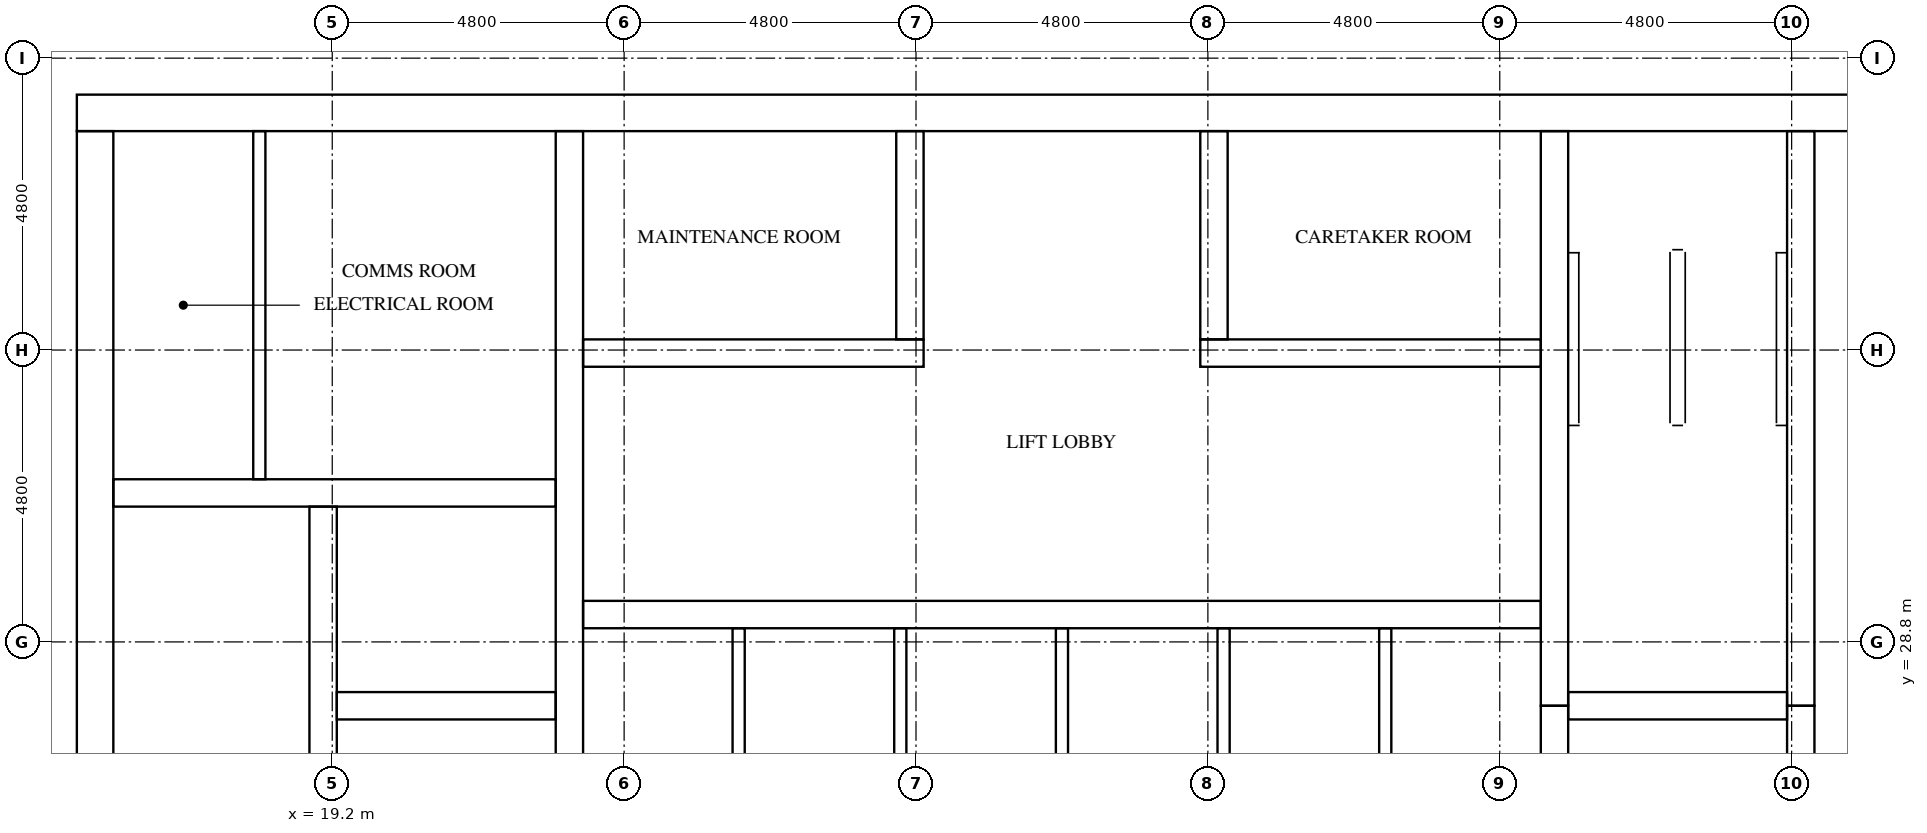
"""IFC4 building model, lengths in metres.
Left out: names, types, materials, properties, quantities, classifications, styles, units other than length and angle.
Written with IfcOpenShell. Run it as: python <this file> out.ifc"""

import sys

from ifc_helpers import new_model, si_unit, direction, frame, frame_2d, origin, place, context, subcontext, project, spatial, rectangle, extrude, element, fill, save


model = new_model("IFC4")
c1 = context("Model", 3, precision=1e-05, world=origin(), true_north=direction((0.0, 1.0)))
c2 = subcontext(c1, "Body", "Model", "MODEL_VIEW")
j1 = project(units=[si_unit("LENGTHUNIT", "METRE"), si_unit("PLANEANGLEUNIT", "RADIAN")], contexts=[c1])
p1 = place(None, origin())
s1 = spatial("IfcSite", under=j1, at=p1, CompositionType="ELEMENT")
p2 = place(p1, origin())
s2 = spatial("IfcBuilding", under=s1, at=p2, CompositionType="ELEMENT")
p3 = place(p2, frame((0.0, 0.0, 252.7)))
s3 = spatial("IfcBuildingStorey", under=s2, at=p3, CompositionType="ELEMENT", Elevation=252.7)
p4 = place(p3, frame((15.0, 37.5, 0.0), z_axis=(0.0, 0.0, 1.0), x_axis=(1.0, 0.0, 0.0)))
e1 = element("IfcWall", 1, at=p4, inside=s3, PredefinedType="SHEAR", context=c2, shape_type="SweptSolid", body=[
    extrude(rectangle(XDim=32.4, YDim=0.6, at=frame_2d((16.2, 0.0))), origin(), (0.0, 0.0, 1.0), 3.2),
])
p5 = place(p4, frame((15.3, 0.0, 0.0)))
e2 = element("IfcOpeningElement", 2, at=p5, cuts=e1, PredefinedType="OPENING", context=c2, shape_type="SweptSolid", body=[
    extrude(rectangle(XDim=1.8, YDim=2.1, at=frame_2d((0.9, 1.05))), frame((0.0, 0.31, 0.0), z_axis=(0.0, -1.0, 0.0), x_axis=(1.0, 0.0, 0.0)), (0.0, 0.0, 1.0), 0.62),
])
p6 = place(p4, frame((1.25, 0.0, 0.0)))
e3 = element("IfcOpeningElement", 3, at=p6, cuts=e1, PredefinedType="OPENING", context=c2, shape_type="SweptSolid", body=[
    extrude(rectangle(XDim=1.0, YDim=2.1, at=frame_2d((0.5, 1.05))), frame((0.0, 0.31, 0.0), z_axis=(0.0, -1.0, 0.0), x_axis=(1.0, 0.0, 0.0)), (0.0, 0.0, 1.0), 0.62),
])
p7 = place(p4, frame((4.988, 0.0, 0.0)))
e4 = element("IfcOpeningElement", 4, at=p7, cuts=e1, PredefinedType="OPENING", context=c2, shape_type="SweptSolid", body=[
    extrude(rectangle(XDim=1.0, YDim=2.1, at=frame_2d((0.5, 1.05))), frame((0.0, 0.31, 0.0), z_axis=(0.0, -1.0, 0.0), x_axis=(1.0, 0.0, 0.0)), (0.0, 0.0, 1.0), 0.62),
])
p8 = place(p3, frame((15.3, 15.6, 0.0), z_axis=(0.0, 0.0, 1.0), x_axis=(0.0, 1.0, 0.0)))
e5 = element("IfcWall", 5, at=p8, inside=s3, PredefinedType="SHEAR", context=c2, shape_type="SweptSolid", body=[
    extrude(rectangle(XDim=21.6, YDim=0.6, at=frame_2d((10.8, 0.0))), origin(), (0.0, 0.0, 1.0), 3.2),
])
p9 = place(p8, frame((5.16, 0.0, 0.0)))
e6 = element("IfcOpeningElement", 6, at=p9, cuts=e5, PredefinedType="OPENING", context=c2, shape_type="SweptSolid", body=[
    extrude(rectangle(XDim=1.2, YDim=2.1, at=frame_2d((0.6, 1.05))), frame((0.0, 0.31, 0.0), z_axis=(0.0, -1.0, 0.0), x_axis=(1.0, 0.0, 0.0)), (0.0, 0.0, 1.0), 0.62),
])
p10 = place(p3, frame((19.05, 15.6, 0.0), z_axis=(0.0, 0.0, 1.0), x_axis=(0.0, 1.0, 0.0)))
e7 = element("IfcWall", 7, at=p10, inside=s3, PredefinedType="SHEAR", context=c2, shape_type="SweptSolid", body=[
    extrude(rectangle(XDim=15.425, YDim=0.45, at=frame_2d((7.712, 0.0))), origin(), (0.0, 0.0, 1.0), 3.2),
])
p11 = place(p10, frame((9.85, 0.0, 0.0)))
e8 = element("IfcOpeningElement", 8, at=p11, cuts=e7, PredefinedType="OPENING", context=c2, shape_type="SweptSolid", body=[
    extrude(rectangle(XDim=1.1, YDim=2.1, at=frame_2d((0.55, 1.05))), frame((0.0, 0.235, 0.0), z_axis=(0.0, -1.0, 0.0), x_axis=(1.0, 0.0, 0.0)), (0.0, 0.0, 1.0), 0.47),
])
p12 = place(p10, frame((13.35, 0.0, 0.0)))
e9 = element("IfcOpeningElement", 9, at=p12, cuts=e7, PredefinedType="OPENING", context=c2, shape_type="SweptSolid", body=[
    extrude(rectangle(XDim=1.1, YDim=2.1, at=frame_2d((0.55, 1.05))), frame((0.0, 0.235, 0.0), z_axis=(0.0, -1.0, 0.0), x_axis=(1.0, 0.0, 0.0)), (0.0, 0.0, 1.0), 0.47),
])
p13 = place(p10, frame((0.6, 0.0, 0.0)))
e10 = element("IfcOpeningElement", 10, at=p13, cuts=e7, PredefinedType="OPENING", context=c2, shape_type="SweptSolid", body=[
    extrude(rectangle(XDim=1.2, YDim=2.1, at=frame_2d((0.6, 1.05))), frame((0.0, 0.235, 0.0), z_axis=(0.0, -1.0, 0.0), x_axis=(1.0, 0.0, 0.0)), (0.0, 0.0, 1.0), 0.47),
])
p14 = place(p3, frame((23.1, 15.6, 0.0), z_axis=(0.0, 0.0, 1.0), x_axis=(0.0, 1.0, 0.0)))
e11 = element("IfcWall", 11, at=p14, inside=s3, PredefinedType="SHEAR", context=c2, shape_type="SweptSolid", body=[
    extrude(rectangle(XDim=21.6, YDim=0.45, at=frame_2d((10.8, 0.0))), origin(), (0.0, 0.0, 1.0), 3.2),
])
p15 = place(p3, frame((39.3, 24.25, 0.0), z_axis=(0.0, 0.0, 1.0), x_axis=(0.0, 1.0, 0.0)))
e12 = element("IfcWall", 12, at=p15, inside=s3, PredefinedType="SHEAR", context=c2, shape_type="SweptSolid", body=[
    extrude(rectangle(XDim=3.5, YDim=0.45, at=frame_2d((1.75, 0.0))), origin(), (0.0, 0.0, 1.0), 3.2),
])
p16 = place(p3, frame((39.3, 27.75, 0.0), z_axis=(0.0, 0.0, 1.0), x_axis=(0.0, 1.0, 0.0)))
e13 = element("IfcWall", 13, at=p16, inside=s3, PredefinedType="SHEAR", context=c2, shape_type="SweptSolid", body=[
    extrude(rectangle(XDim=9.45, YDim=0.45, at=frame_2d((4.725, 0.0))), origin(), (0.0, 0.0, 1.0), 3.2),
])
p17 = place(p3, frame((43.35, 24.25, 0.0), z_axis=(0.0, 0.0, 1.0), x_axis=(0.0, 1.0, 0.0)))
e14 = element("IfcWall", 14, at=p17, inside=s3, PredefinedType="SHEAR", context=c2, shape_type="SweptSolid", body=[
    extrude(rectangle(XDim=3.5, YDim=0.45, at=frame_2d((1.75, 0.0))), origin(), (0.0, 0.0, 1.0), 3.2),
])
p18 = place(p17, frame((1.2, 0.0, 0.0)))
e15 = element("IfcOpeningElement", 15, at=p18, cuts=e14, PredefinedType="OPENING", context=c2, shape_type="SweptSolid", body=[
    extrude(rectangle(XDim=1.1, YDim=2.1, at=frame_2d((0.55, 1.05))), frame((0.0, 0.235, 0.0), z_axis=(0.0, -1.0, 0.0), x_axis=(1.0, 0.0, 0.0)), (0.0, 0.0, 1.0), 0.47),
])
p19 = place(p3, frame((43.35, 27.75, 0.0), z_axis=(0.0, 0.0, 1.0), x_axis=(0.0, 1.0, 0.0)))
e16 = element("IfcWall", 16, at=p19, inside=s3, PredefinedType="SHEAR", context=c2, shape_type="SweptSolid", body=[
    extrude(rectangle(XDim=9.45, YDim=0.45, at=frame_2d((4.725, 0.0))), origin(), (0.0, 0.0, 1.0), 3.2),
])
p20 = place(p19, frame((7.65, 0.0, 0.0)))
e17 = element("IfcOpeningElement", 17, at=p20, cuts=e16, PredefinedType="OPENING", context=c2, shape_type="SweptSolid", body=[
    extrude(rectangle(XDim=1.2, YDim=2.1, at=frame_2d((0.6, 1.05))), frame((0.0, 0.235, 0.0), z_axis=(0.0, -1.0, 0.0), x_axis=(1.0, 0.0, 0.0)), (0.0, 0.0, 1.0), 0.47),
])
p21 = place(p3, frame((19.275, 27.75, 0.0), z_axis=(0.0, 0.0, 1.0), x_axis=(1.0, 0.0, 0.0)))
e18 = element("IfcWall", 18, at=p21, inside=s3, PredefinedType="SHEAR", context=c2, shape_type="SweptSolid", body=[
    extrude(rectangle(XDim=3.6, YDim=0.45, at=frame_2d((1.8, 0.0))), origin(), (0.0, 0.0, 1.0), 3.2),
])
p22 = place(p3, frame((15.6, 31.25, 0.0), z_axis=(0.0, 0.0, 1.0), x_axis=(1.0, 0.0, 0.0)))
e19 = element("IfcWall", 19, at=p22, inside=s3, PredefinedType="SHEAR", context=c2, shape_type="SweptSolid", body=[
    extrude(rectangle(XDim=7.275, YDim=0.45, at=frame_2d((3.637, 0.0))), origin(), (0.0, 0.0, 1.0), 3.2),
])
p23 = place(p3, frame((39.525, 27.75, 0.0), z_axis=(0.0, 0.0, 1.0), x_axis=(1.0, 0.0, 0.0)))
e20 = element("IfcWall", 20, at=p23, inside=s3, PredefinedType="SHEAR", context=c2, shape_type="SweptSolid", body=[
    extrude(rectangle(XDim=3.6, YDim=0.45, at=frame_2d((1.8, 0.0))), origin(), (0.0, 0.0, 1.0), 3.2),
])
p24 = place(p3, frame((23.325, 29.25, 0.0), z_axis=(0.0, 0.0, 1.0), x_axis=(1.0, 0.0, 0.0)))
e21 = element("IfcWall", 21, at=p24, inside=s3, PredefinedType="SHEAR", context=c2, shape_type="SweptSolid", body=[
    extrude(rectangle(XDim=15.75, YDim=0.45, at=frame_2d((7.875, 0.0))), origin(), (0.0, 0.0, 1.0), 3.2),
])
p25 = place(p24, frame((0.679, 0.0, 0.0)))
e22 = element("IfcOpeningElement", 22, at=p25, cuts=e21, PredefinedType="OPENING", context=c2, shape_type="SweptSolid", body=[
    extrude(rectangle(XDim=1.1, YDim=2.1, at=frame_2d((0.55, 1.05))), frame((0.0, 0.235, 0.0), z_axis=(0.0, -1.0, 0.0), x_axis=(1.0, 0.0, 0.0)), (0.0, 0.0, 1.0), 0.47),
])
p26 = place(p24, frame((3.337, 0.0, 0.0)))
e23 = element("IfcOpeningElement", 23, at=p26, cuts=e21, PredefinedType="OPENING", context=c2, shape_type="SweptSolid", body=[
    extrude(rectangle(XDim=1.1, YDim=2.1, at=frame_2d((0.55, 1.05))), frame((0.0, 0.235, 0.0), z_axis=(0.0, -1.0, 0.0), x_axis=(1.0, 0.0, 0.0)), (0.0, 0.0, 1.0), 0.47),
])
p27 = place(p24, frame((5.996, 0.0, 0.0)))
e24 = element("IfcOpeningElement", 24, at=p27, cuts=e21, PredefinedType="OPENING", context=c2, shape_type="SweptSolid", body=[
    extrude(rectangle(XDim=1.1, YDim=2.1, at=frame_2d((0.55, 1.05))), frame((0.0, 0.235, 0.0), z_axis=(0.0, -1.0, 0.0), x_axis=(1.0, 0.0, 0.0)), (0.0, 0.0, 1.0), 0.47),
])
p28 = place(p24, frame((8.654, 0.0, 0.0)))
e25 = element("IfcOpeningElement", 25, at=p28, cuts=e21, PredefinedType="OPENING", context=c2, shape_type="SweptSolid", body=[
    extrude(rectangle(XDim=1.1, YDim=2.1, at=frame_2d((0.55, 1.05))), frame((0.0, 0.235, 0.0), z_axis=(0.0, -1.0, 0.0), x_axis=(1.0, 0.0, 0.0)), (0.0, 0.0, 1.0), 0.47),
])
p29 = place(p24, frame((11.312, 0.0, 0.0)))
e26 = element("IfcOpeningElement", 26, at=p29, cuts=e21, PredefinedType="OPENING", context=c2, shape_type="SweptSolid", body=[
    extrude(rectangle(XDim=1.1, YDim=2.1, at=frame_2d((0.55, 1.05))), frame((0.0, 0.235, 0.0), z_axis=(0.0, -1.0, 0.0), x_axis=(1.0, 0.0, 0.0)), (0.0, 0.0, 1.0), 0.47),
])
p30 = place(p24, frame((13.971, 0.0, 0.0)))
e27 = element("IfcOpeningElement", 27, at=p30, cuts=e21, PredefinedType="OPENING", context=c2, shape_type="SweptSolid", body=[
    extrude(rectangle(XDim=1.1, YDim=2.1, at=frame_2d((0.55, 1.05))), frame((0.0, 0.235, 0.0), z_axis=(0.0, -1.0, 0.0), x_axis=(1.0, 0.0, 0.0)), (0.0, 0.0, 1.0), 0.47),
])
p31 = place(p3, frame((23.325, 33.55, 0.0), z_axis=(0.0, 0.0, 1.0), x_axis=(1.0, 0.0, 0.0)))
e28 = element("IfcWall", 28, at=p31, inside=s3, PredefinedType="SHEAR", context=c2, shape_type="SweptSolid", body=[
    extrude(rectangle(XDim=5.6, YDim=0.45, at=frame_2d((2.8, 0.0))), origin(), (0.0, 0.0, 1.0), 3.2),
])
p32 = place(p31, frame((2.075, 0.0, 0.0)))
e29 = element("IfcOpeningElement", 29, at=p32, cuts=e28, PredefinedType="OPENING", context=c2, shape_type="SweptSolid", body=[
    extrude(rectangle(XDim=1.0, YDim=2.1, at=frame_2d((0.5, 1.05))), frame((0.0, 0.235, 0.0), z_axis=(0.0, -1.0, 0.0), x_axis=(1.0, 0.0, 0.0)), (0.0, 0.0, 1.0), 0.47),
])
p33 = place(p3, frame((33.475, 33.55, 0.0), z_axis=(0.0, 0.0, 1.0), x_axis=(1.0, 0.0, 0.0)))
e30 = element("IfcWall", 30, at=p33, inside=s3, PredefinedType="SHEAR", context=c2, shape_type="SweptSolid", body=[
    extrude(rectangle(XDim=5.6, YDim=0.45, at=frame_2d((2.8, 0.0))), origin(), (0.0, 0.0, 1.0), 3.2),
])
p34 = place(p33, frame((2.525, 0.0, 0.0)))
e31 = element("IfcOpeningElement", 31, at=p34, cuts=e30, PredefinedType="OPENING", context=c2, shape_type="SweptSolid", body=[
    extrude(rectangle(XDim=1.0, YDim=2.1, at=frame_2d((0.5, 1.05))), frame((0.0, 0.235, 0.0), z_axis=(0.0, -1.0, 0.0), x_axis=(1.0, 0.0, 0.0)), (0.0, 0.0, 1.0), 0.47),
])
for number, where, z_axis, x_axis in (
    (32, (28.7, 33.775, 0.0), (0.0, 0.0, 1.0), (0.0, 1.0, 0.0)),
    (33, (33.7, 33.775, 0.0), (0.0, 0.0, 1.0), (0.0, 1.0, 0.0)),
):
    element("IfcWall", number, at=place(p3, frame(where, z_axis=z_axis, x_axis=x_axis)), inside=s3, PredefinedType="SHEAR", context=c2, shape_type="SweptSolid", body=[
        extrude(rectangle(XDim=3.425, YDim=0.45, at=frame_2d((1.712, 0.0))), origin(), (0.0, 0.0, 1.0), 3.2),
    ])
for number, where, z_axis, x_axis in (
    (34, (25.883, 26.375, 0.0), (0.0, 0.0, 1.0), (0.0, 1.0, 0.0)),
    (35, (28.542, 26.375, 0.0), (0.0, 0.0, 1.0), (0.0, 1.0, 0.0)),
    (36, (31.2, 26.375, 0.0), (0.0, 0.0, 1.0), (0.0, 1.0, 0.0)),
    (37, (33.858, 26.375, 0.0), (0.0, 0.0, 1.0), (0.0, 1.0, 0.0)),
    (38, (36.517, 26.375, 0.0), (0.0, 0.0, 1.0), (0.0, 1.0, 0.0)),
):
    element("IfcWall", number, at=place(p3, frame(where, z_axis=z_axis, x_axis=x_axis)), inside=s3, PredefinedType="SOLIDWALL", context=c2, shape_type="SweptSolid", body=[
        extrude(rectangle(XDim=2.65, YDim=0.2, at=frame_2d((1.325, 0.0))), origin(), (0.0, 0.0, 1.0), 3.2),
    ])
p35 = place(p3, frame((18.001, 31.475, 0.0), z_axis=(0.0, 0.0, 1.0), x_axis=(0.0, 1.0, 0.0)))
e39 = element("IfcWall", 39, at=p35, inside=s3, PredefinedType="PARTITIONING", context=c2, shape_type="SweptSolid", body=[
    extrude(rectangle(XDim=5.725, YDim=0.2, at=frame_2d((2.862, 0.0))), origin(), (0.0, 0.0, 1.0), 3.2),
])
p36 = place(p25, origin())
e40 = element("IfcDoor", 40, at=p36, inside=s3, OperationType="DOUBLE_DOOR_SLIDING", PredefinedType="DOOR", context=c2, shape_type="SweptSolid", body=[
    extrude(rectangle(XDim=1.1, YDim=2.1, at=frame_2d((0.55, 1.05))), frame((0.0, 0.025, 0.0), z_axis=(0.0, -1.0, 0.0), x_axis=(1.0, 0.0, 0.0)), (0.0, 0.0, 1.0), 0.05),
])
fill(e22, e40)
p37 = place(p26, origin())
e41 = element("IfcDoor", 41, at=p37, inside=s3, OperationType="DOUBLE_DOOR_SLIDING", PredefinedType="DOOR", context=c2, shape_type="SweptSolid", body=[
    extrude(rectangle(XDim=1.1, YDim=2.1, at=frame_2d((0.55, 1.05))), frame((0.0, 0.025, 0.0), z_axis=(0.0, -1.0, 0.0), x_axis=(1.0, 0.0, 0.0)), (0.0, 0.0, 1.0), 0.05),
])
fill(e23, e41)
p38 = place(p27, origin())
e42 = element("IfcDoor", 42, at=p38, inside=s3, OperationType="DOUBLE_DOOR_SLIDING", PredefinedType="DOOR", context=c2, shape_type="SweptSolid", body=[
    extrude(rectangle(XDim=1.1, YDim=2.1, at=frame_2d((0.55, 1.05))), frame((0.0, 0.025, 0.0), z_axis=(0.0, -1.0, 0.0), x_axis=(1.0, 0.0, 0.0)), (0.0, 0.0, 1.0), 0.05),
])
fill(e24, e42)
p39 = place(p28, origin())
e43 = element("IfcDoor", 43, at=p39, inside=s3, OperationType="DOUBLE_DOOR_SLIDING", PredefinedType="DOOR", context=c2, shape_type="SweptSolid", body=[
    extrude(rectangle(XDim=1.1, YDim=2.1, at=frame_2d((0.55, 1.05))), frame((0.0, 0.025, 0.0), z_axis=(0.0, -1.0, 0.0), x_axis=(1.0, 0.0, 0.0)), (0.0, 0.0, 1.0), 0.05),
])
fill(e25, e43)
p40 = place(p29, origin())
e44 = element("IfcDoor", 44, at=p40, inside=s3, OperationType="DOUBLE_DOOR_SLIDING", PredefinedType="DOOR", context=c2, shape_type="SweptSolid", body=[
    extrude(rectangle(XDim=1.1, YDim=2.1, at=frame_2d((0.55, 1.05))), frame((0.0, 0.025, 0.0), z_axis=(0.0, -1.0, 0.0), x_axis=(1.0, 0.0, 0.0)), (0.0, 0.0, 1.0), 0.05),
])
fill(e26, e44)
p41 = place(p30, origin())
e45 = element("IfcDoor", 45, at=p41, inside=s3, OperationType="DOUBLE_DOOR_SLIDING", PredefinedType="DOOR", context=c2, shape_type="SweptSolid", body=[
    extrude(rectangle(XDim=1.1, YDim=2.1, at=frame_2d((0.55, 1.05))), frame((0.0, 0.025, 0.0), z_axis=(0.0, -1.0, 0.0), x_axis=(1.0, 0.0, 0.0)), (0.0, 0.0, 1.0), 0.05),
])
fill(e27, e45)
p42 = place(p12, origin())
e46 = element("IfcDoor", 46, at=p42, inside=s3, OperationType="DOUBLE_DOOR_SLIDING", PredefinedType="DOOR", context=c2, shape_type="SweptSolid", body=[
    extrude(rectangle(XDim=1.1, YDim=2.1, at=frame_2d((0.55, 1.05))), frame((0.0, 0.025, 0.0), z_axis=(0.0, -1.0, 0.0), x_axis=(1.0, 0.0, 0.0)), (0.0, 0.0, 1.0), 0.05),
])
fill(e9, e46)
p43 = place(p20, origin())
e47 = element("IfcDoor", 47, at=p43, inside=s3, OperationType="SINGLE_SWING_RIGHT", PredefinedType="DOOR", context=c2, shape_type="SweptSolid", body=[
    extrude(rectangle(XDim=1.2, YDim=2.1, at=frame_2d((0.6, 1.05))), frame((0.0, 0.025, 0.0), z_axis=(0.0, -1.0, 0.0), x_axis=(1.0, 0.0, 0.0)), (0.0, 0.0, 1.0), 0.05),
])
fill(e17, e47)
p44 = place(p5, origin())
e48 = element("IfcDoor", 48, at=p44, inside=s3, OperationType="DOUBLE_DOOR_SINGLE_SWING", PredefinedType="DOOR", context=c2, shape_type="SweptSolid", body=[
    extrude(rectangle(XDim=1.8, YDim=2.1, at=frame_2d((0.9, 1.05))), frame((0.0, 0.025, 0.0), z_axis=(0.0, -1.0, 0.0), x_axis=(1.0, 0.0, 0.0)), (0.0, 0.0, 1.0), 0.05),
])
fill(e2, e48)
p45 = place(p6, origin())
e49 = element("IfcDoor", 49, at=p45, inside=s3, OperationType="SINGLE_SWING_LEFT", PredefinedType="DOOR", context=c2, shape_type="SweptSolid", body=[
    extrude(rectangle(XDim=1.0, YDim=2.1, at=frame_2d((0.5, 1.05))), frame((0.0, 0.025, 0.0), z_axis=(0.0, -1.0, 0.0), x_axis=(1.0, 0.0, 0.0)), (0.0, 0.0, 1.0), 0.05),
])
fill(e3, e49)
p46 = place(p7, origin())
e50 = element("IfcDoor", 50, at=p46, inside=s3, OperationType="SINGLE_SWING_RIGHT", PredefinedType="DOOR", context=c2, shape_type="SweptSolid", body=[
    extrude(rectangle(XDim=1.0, YDim=2.1, at=frame_2d((0.5, 1.05))), frame((0.0, 0.025, 0.0), z_axis=(0.0, -1.0, 0.0), x_axis=(1.0, 0.0, 0.0)), (0.0, 0.0, 1.0), 0.05),
])
fill(e4, e50)
p47 = place(p32, frame((1.0, 0.0, 0.0), z_axis=(0.0, 0.0, 1.0), x_axis=(-1.0, 0.0, 0.0)))
e51 = element("IfcDoor", 51, at=p47, inside=s3, OperationType="SINGLE_SWING_LEFT", PredefinedType="DOOR", context=c2, shape_type="SweptSolid", body=[
    extrude(rectangle(XDim=1.0, YDim=2.1, at=frame_2d((0.5, 1.05))), frame((0.0, 0.025, 0.0), z_axis=(0.0, -1.0, 0.0), x_axis=(1.0, 0.0, 0.0)), (0.0, 0.0, 1.0), 0.05),
])
fill(e29, e51)
p48 = place(p34, frame((1.0, 0.0, 0.0), z_axis=(0.0, 0.0, 1.0), x_axis=(-1.0, 0.0, 0.0)))
e52 = element("IfcDoor", 52, at=p48, inside=s3, OperationType="SINGLE_SWING_RIGHT", PredefinedType="DOOR", context=c2, shape_type="SweptSolid", body=[
    extrude(rectangle(XDim=1.0, YDim=2.1, at=frame_2d((0.5, 1.05))), frame((0.0, 0.025, 0.0), z_axis=(0.0, -1.0, 0.0), x_axis=(1.0, 0.0, 0.0)), (0.0, 0.0, 1.0), 0.05),
])
fill(e31, e52)
save(model, sys.argv[1])
